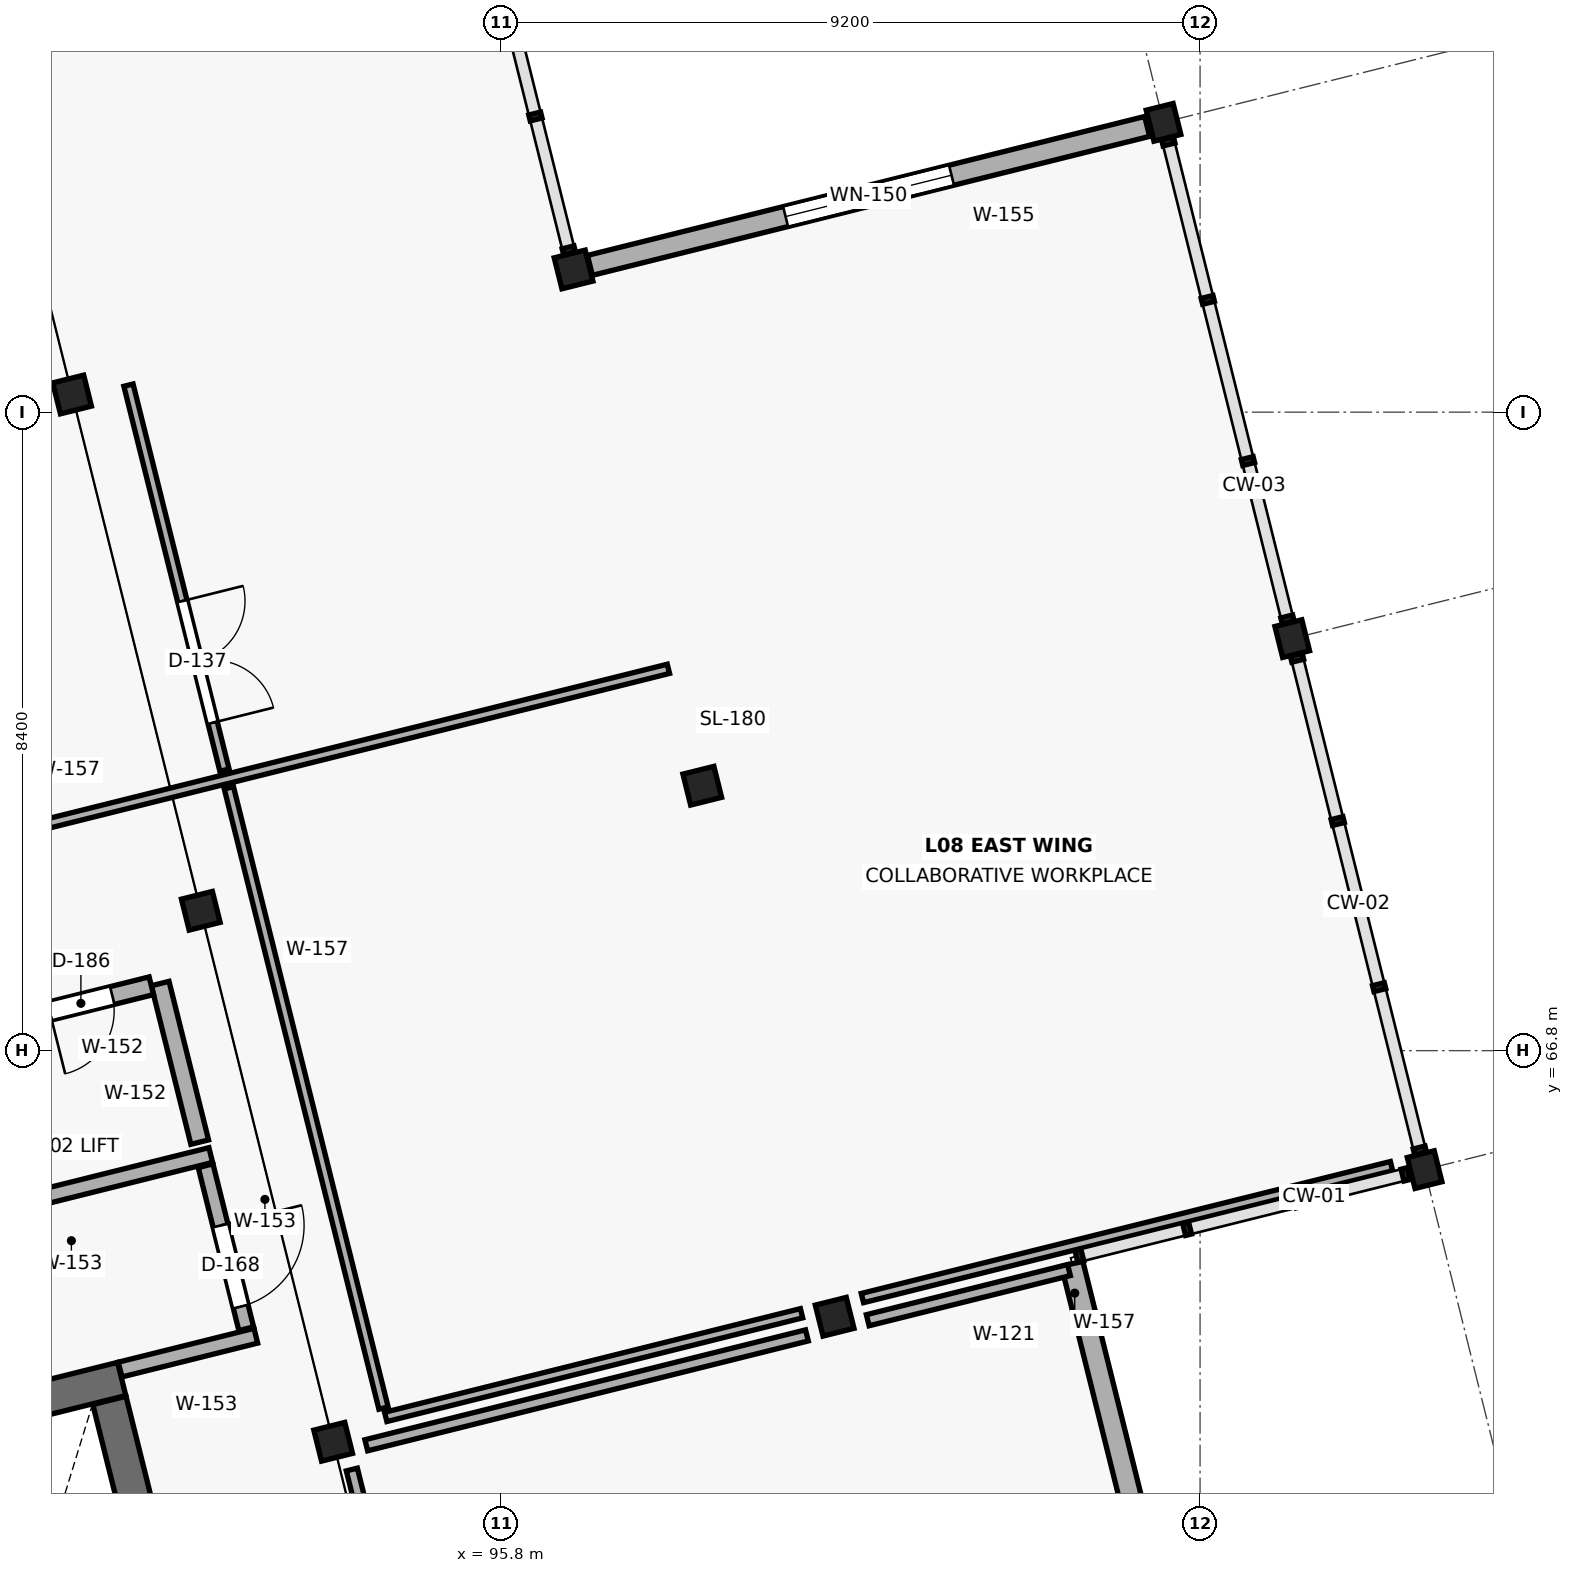
"""IFC4 building model, lengths in metres.
Left out: names, types, materials, properties, quantities, classifications, styles, units other than length and angle.
Written with IfcOpenShell. Run it as: python <this file> out.ifc"""

import sys

from ifc_helpers import new_model, si_unit, direction, frame, frame_2d, origin, origin_2d, place, context, subcontext, project, spatial, rectangle, extrude, element, fill, save


model = new_model("IFC4")
c1 = context("Model", 3, precision=1e-05, world=origin(), true_north=direction((0.0, 1.0)))
c2 = subcontext(c1, "Body", "Model", "MODEL_VIEW")
j1 = project(units=[si_unit("LENGTHUNIT", "METRE"), si_unit("PLANEANGLEUNIT", "RADIAN")], contexts=[c1])
p1 = place(None, origin())
s1 = spatial("IfcSite", under=j1, at=p1, CompositionType="ELEMENT")
p2 = place(p1, origin())
s2 = spatial("IfcBuilding", under=s1, at=p2, CompositionType="ELEMENT")
p3 = place(p2, frame((0.0, 0.0, 33.9)))
s3 = spatial("IfcBuildingStorey", under=s2, at=p3, CompositionType="ELEMENT", Elevation=33.9)
for number, where, z_axis, x_axis in (
    (1, (93.594, 61.654, 0.0), (0.0, 0.0, 1.0), (0.97, 0.242, 0.0)),
    (2, (91.852, 68.64, 0.0), (0.0, 0.0, 1.0), (0.97, 0.242, 0.0)),
    (3, (90.159, 75.432, 0.0), (0.0, 0.0, 1.0), (0.97, 0.242, 0.0)),
    (4, (100.192, 63.299, 0.0), (0.0, 0.0, 1.0), (0.97, 0.242, 0.0)),
    (5, (98.45, 70.285, 0.0), (0.0, 0.0, 1.0), (0.97, 0.242, 0.0)),
    (6, (96.757, 77.077, 0.0), (0.0, 0.0, 1.0), (0.97, 0.242, 0.0)),
):
    element("IfcColumn", number, at=place(p3, frame(where, z_axis=z_axis, x_axis=x_axis)), inside=s3, PredefinedType="COLUMN", context=c2, shape_type="SweptSolid", body=[
        extrude(rectangle(XDim=0.42, YDim=0.42, at=origin_2d()), origin(), (0.0, 0.0, 1.0), 3.9),
    ])
for number, where, z_axis, x_axis in (
    (7, (107.955, 65.235, 0.0), (0.0, 0.0, 1.0), (0.97, 0.242, 0.0)),
    (8, (106.213, 72.221, 0.0), (0.0, 0.0, 1.0), (0.97, 0.242, 0.0)),
    (9, (104.519, 79.013, 0.0), (0.0, 0.0, 1.0), (0.97, 0.242, 0.0)),
):
    element("IfcColumn", number, at=place(p3, frame(where, z_axis=z_axis, x_axis=x_axis)), inside=s3, PredefinedType="COLUMN", context=c2, shape_type="SweptSolid", body=[
        extrude(rectangle(XDim=0.365, YDim=0.42, at=origin_2d()), origin(), (0.0, 0.0, 1.0), 3.9),
    ])
p4 = place(p3, frame((103.316, 63.996, 0.0), z_axis=(0.0, 0.0, 1.0), x_axis=(0.241920698583, -0.970296024725, 0.0)))
e10 = element("IfcWall", 10, at=p4, inside=s3, PredefinedType="SOLIDWALL", context=c2, shape_type="SweptSolid", body=[
    extrude(rectangle(XDim=13.64, YDim=0.29, at=frame_2d((6.82, 0.0))), origin(), (0.0, 0.0, 1.0), 2.79),
])
p5 = place(p4, frame((5.695, 0.0, 0.8)))
e11 = element("IfcOpeningElement", 11, at=p5, cuts=e10, PredefinedType="OPENING", context=c2, shape_type="SweptSolid", body=[
    extrude(rectangle(XDim=2.25, YDim=1.95, at=frame_2d((1.125, 0.975))), frame((0.0, 0.157, 0.0), z_axis=(0.0, -1.0, 0.0), x_axis=(1.0, 0.0, 0.0)), (0.0, 0.0, 1.0), 0.314),
])
p6 = place(p3, frame((96.972, 77.131, 0.0), z_axis=(0.0, 0.0, 1.0), x_axis=(0.970290568044, 0.2419425832, 0.0)))
e12 = element("IfcWall", 12, at=p6, inside=s3, PredefinedType="SOLIDWALL", context=c2, shape_type="SweptSolid", body=[
    extrude(rectangle(XDim=7.556, YDim=0.27, at=frame_2d((3.778, 0.0))), origin(), (0.0, 0.0, 1.0), 2.79),
])
p7 = place(p6, frame((2.653, 0.0, 0.8)))
e13 = element("IfcOpeningElement", 13, at=p7, cuts=e12, PredefinedType="OPENING", context=c2, shape_type="SweptSolid", body=[
    extrude(rectangle(XDim=2.25, YDim=1.95, at=frame_2d((1.125, 0.975))), frame((0.0, 0.147, 0.0), z_axis=(0.0, -1.0, 0.0), x_axis=(1.0, 0.0, 0.0)), (0.0, 0.0, 1.0), 0.294),
])
p8 = place(p3, frame((90.812, 62.48, 0.0), z_axis=(0.0, 0.0, 1.0), x_axis=(-0.970309259708, -0.2418676095, 0.0)))
e14 = element("IfcWall", 14, at=p8, inside=s3, PredefinedType="SHEAR", context=c2, shape_type="SweptSolid", body=[
    extrude(rectangle(XDim=4.3, YDim=0.45, at=frame_2d((2.15, 0.0))), origin(), (0.0, 0.0, 1.0), 3.72),
])
p9 = place(p3, frame((92.436, 55.037, 0.0), z_axis=(0.0, 0.0, 1.0), x_axis=(-0.241920660665, 0.970296034179, 0.0)))
e15 = element("IfcWall", 15, at=p9, inside=s3, PredefinedType="SHEAR", context=c2, shape_type="SweptSolid", body=[
    extrude(rectangle(XDim=7.38, YDim=0.45, at=frame_2d((3.69, 0.0))), origin(), (0.0, 0.0, 1.0), 3.72),
])
p10 = place(p3, frame((90.791, 62.604, 0.0), z_axis=(0.0, 0.0, 1.0), x_axis=(0.970306180373, 0.241879962645, 0.0)))
e16 = element("IfcWall", 16, at=p10, inside=s3, PredefinedType="STANDARD", context=c2, shape_type="SweptSolid", body=[
    extrude(rectangle(XDim=1.84, YDim=0.2, at=frame_2d((0.92, 0.0))), origin(), (0.0, 0.0, 1.0), 3.72),
])
p11 = place(p3, frame((89.218, 64.737, 0.0), z_axis=(0.0, 0.0, 1.0), x_axis=(0.97027839681, 0.241991389687, 0.0)))
e17 = element("IfcWall", 17, at=p11, inside=s3, PredefinedType="STANDARD", context=c2, shape_type="SweptSolid", body=[
    extrude(rectangle(XDim=2.85, YDim=0.2, at=frame_2d((1.425, 0.0))), origin(), (0.0, 0.0, 1.0), 3.72),
])
p12 = place(p3, frame((91.916, 65.286, 0.0), z_axis=(0.0, 0.0, 1.0), x_axis=(0.241911789465, -0.970298245963, 0.0)))
e18 = element("IfcWall", 18, at=p12, inside=s3, PredefinedType="STANDARD", context=c2, shape_type="SweptSolid", body=[
    extrude(rectangle(XDim=2.21, YDim=0.2, at=frame_2d((1.105, 0.0))), origin(), (0.0, 0.0, 1.0), 3.72),
])
p13 = place(p12, frame((0.81, 0.0, 0.0)))
e19 = element("IfcOpeningElement", 19, at=p13, cuts=e18, PredefinedType="OPENING", context=c2, shape_type="SweptSolid", body=[
    extrude(rectangle(XDim=1.1, YDim=2.2, at=frame_2d((0.55, 1.1))), frame((0.0, 0.112, 0.0), z_axis=(0.0, -1.0, 0.0), x_axis=(1.0, 0.0, 0.0)), (0.0, 0.0, 1.0), 0.224),
])
p14 = place(p3, frame((91.838, 65.596, 0.0), z_axis=(0.0, 0.0, 1.0), x_axis=(-0.2418676095, 0.970309259708, 0.0)))
e20 = element("IfcWall", 20, at=p14, inside=s3, PredefinedType="STANDARD", context=c2, shape_type="SweptSolid", body=[
    extrude(rectangle(XDim=2.15, YDim=0.24, at=frame_2d((1.075, 0.0))), origin(), (0.0, 0.0, 1.0), 3.72),
])
p15 = place(p3, frame((91.202, 67.654, 0.0), z_axis=(0.0, 0.0, 1.0), x_axis=(-0.970304433136, -0.241886971613, 0.0)))
e21 = element("IfcWall", 21, at=p15, inside=s3, PredefinedType="STANDARD", context=c2, shape_type="SweptSolid", body=[
    extrude(rectangle(XDim=2.48, YDim=0.24, at=frame_2d((1.24, 0.0))), origin(), (0.0, 0.0, 1.0), 3.72),
])
p16 = place(p15, frame((0.53, 0.0, 0.0)))
e22 = element("IfcOpeningElement", 22, at=p16, cuts=e21, PredefinedType="OPENING", context=c2, shape_type="SweptSolid", body=[
    extrude(rectangle(XDim=0.85, YDim=2.1, at=frame_2d((0.425, 1.05))), frame((0.0, 0.132, 0.0), z_axis=(0.0, -1.0, 0.0), x_axis=(1.0, 0.0, 0.0)), (0.0, 0.0, 1.0), 0.264),
])
p17 = place(p3, frame((77.638, 66.745, 0.0), z_axis=(0.0, 0.0, 1.0), x_axis=(0.970296248646, 0.241919800477, 0.0)))
e23 = element("IfcWall", 23, at=p17, inside=s3, PredefinedType="PARTITIONING", context=c2, shape_type="SweptSolid", body=[
    extrude(rectangle(XDim=20.99, YDim=0.125, at=frame_2d((10.495, 0.0))), origin(), (0.0, 0.0, 1.0), 3.72),
])
p18 = place(p17, frame((8.681, 0.0, 0.0)))
e24 = element("IfcOpeningElement", 24, at=p18, cuts=e23, PredefinedType="OPENING", context=c2, shape_type="SweptSolid", body=[
    extrude(rectangle(XDim=1.65, YDim=2.35, at=frame_2d((0.825, 1.175))), frame((0.0, 0.074, 0.0), z_axis=(0.0, -1.0, 0.0), x_axis=(1.0, 0.0, 0.0)), (0.0, 0.0, 1.0), 0.149),
])
p19 = place(p3, frame((103.275, 63.913, 0.0), z_axis=(0.0, 0.0, 1.0), x_axis=(-0.970289695095, -0.241946084059, 0.0)))
e25 = element("IfcWall", 25, at=p19, inside=s3, PredefinedType="PARTITIONING", context=c2, shape_type="SweptSolid", body=[
    extrude(rectangle(XDim=2.729, YDim=0.15, at=frame_2d((1.364, 0.0))), origin(), (0.0, 0.0, 1.0), 3.72),
])
p20 = place(p3, frame((99.827, 63.054, 0.0), z_axis=(0.0, 0.0, 1.0), x_axis=(-0.970293732071, -0.24192989378, 0.0)))
e26 = element("IfcWall", 26, at=p20, inside=s3, PredefinedType="PARTITIONING", context=c2, shape_type="SweptSolid", body=[
    extrude(rectangle(XDim=5.975, YDim=0.15, at=frame_2d((2.988, 0.0))), origin(), (0.0, 0.0, 1.0), 3.72),
])
p21 = place(p3, frame((93.84, 61.289, 0.0), z_axis=(0.0, 0.0, 1.0), x_axis=(0.241921603562, -0.970295799089, 0.0)))
e27 = element("IfcWall", 27, at=p21, inside=s3, PredefinedType="PARTITIONING", context=c2, shape_type="SweptSolid", body=[
    extrude(rectangle(XDim=6.175, YDim=0.15, at=frame_2d((3.087, 0.0))), origin(), (0.0, 0.0, 1.0), 3.035),
])
p22 = place(p3, frame((94.286, 61.981, 0.0), z_axis=(0.0, 0.0, 1.0), x_axis=(0.970297669748, 0.241914100624, 0.0)))
e28 = element("IfcWall", 28, at=p22, inside=s3, PredefinedType="PARTITIONING", context=c2, shape_type="SweptSolid", body=[
    extrude(rectangle(XDim=5.638, YDim=0.125, at=frame_2d((2.819, 0.0))), origin(), (0.0, 0.0, 1.0), 3.72),
])
p23 = place(p3, frame((100.557, 63.545, 0.0), z_axis=(0.0, 0.0, 1.0), x_axis=(0.970294426978, 0.241927106741, 0.0)))
e29 = element("IfcWall", 29, at=p23, inside=s3, PredefinedType="PARTITIONING", context=c2, shape_type="SweptSolid", body=[
    extrude(rectangle(XDim=7.175, YDim=0.125, at=frame_2d((3.587, 0.0))), origin(), (0.0, 0.0, 1.0), 3.72),
])
p24 = place(p3, frame((90.901, 75.556, 0.0), z_axis=(0.0, 0.0, 1.0), x_axis=(0.241897292077, -0.970301860292, 0.0)))
e30 = element("IfcWall", 30, at=p24, inside=s3, PredefinedType="PARTITIONING", context=c2, shape_type="SweptSolid", body=[
    extrude(rectangle(XDim=5.22, YDim=0.125, at=frame_2d((2.61, 0.0))), origin(), (0.0, 0.0, 1.0), 3.72),
])
p25 = place(p24, frame((2.928, 0.0, 0.0)))
e31 = element("IfcOpeningElement", 31, at=p25, cuts=e30, PredefinedType="OPENING", context=c2, shape_type="SweptSolid", body=[
    extrude(rectangle(XDim=1.65, YDim=2.35, at=frame_2d((0.825, 1.175))), frame((0.0, 0.074, 0.0), z_axis=(0.0, -1.0, 0.0), x_axis=(1.0, 0.0, 0.0)), (0.0, 0.0, 1.0), 0.149),
])
p26 = place(p3, frame((92.222, 70.258, 0.0), z_axis=(0.0, 0.0, 1.0), x_axis=(0.241934490518, -0.970292585923, 0.0)))
e32 = element("IfcWall", 32, at=p26, inside=s3, PredefinedType="PARTITIONING", context=c2, shape_type="SweptSolid", body=[
    extrude(rectangle(XDim=8.41, YDim=0.125, at=frame_2d((4.205, 0.0))), origin(), (0.0, 0.0, 1.0), 3.72),
])
p27 = place(p7, origin())
e33 = element("IfcWindow", 33, at=p27, inside=s3, PartitioningType="SINGLE_PANEL", PredefinedType="WINDOW", context=c2, shape_type="SweptSolid", body=[
    extrude(rectangle(XDim=2.25, YDim=1.95, at=frame_2d((1.125, 0.975))), frame((0.0, 0.03, 0.0), z_axis=(0.0, -1.0, 0.0), x_axis=(1.0, 0.0, 0.0)), (0.0, 0.0, 1.0), 0.06),
])
fill(e13, e33)
p28 = place(p13, origin())
e34 = element("IfcDoor", 34, at=p28, inside=s3, OperationType="SINGLE_SWING_LEFT", PredefinedType="DOOR", context=c2, shape_type="SweptSolid", body=[
    extrude(rectangle(XDim=1.1, YDim=2.2, at=frame_2d((0.55, 1.1))), frame((0.0, 0.025, 0.0), z_axis=(0.0, -1.0, 0.0), x_axis=(1.0, 0.0, 0.0)), (0.0, 0.0, 1.0), 0.05),
])
fill(e19, e34)
p29 = place(p16, origin())
e35 = element("IfcDoor", 35, at=p29, inside=s3, OperationType="SINGLE_SWING_RIGHT", PredefinedType="DOOR", context=c2, shape_type="SweptSolid", body=[
    extrude(rectangle(XDim=0.85, YDim=2.1, at=frame_2d((0.425, 1.05))), frame((0.0, 0.025, 0.0), z_axis=(0.0, -1.0, 0.0), x_axis=(1.0, 0.0, 0.0)), (0.0, 0.0, 1.0), 0.05),
])
fill(e22, e35)
p30 = place(p25, origin())
e36 = element("IfcDoor", 36, at=p30, inside=s3, OperationType="DOUBLE_DOOR_SINGLE_SWING", PredefinedType="DOOR", context=c2, shape_type="SweptSolid", body=[
    extrude(rectangle(XDim=1.65, YDim=2.35, at=frame_2d((0.825, 1.175))), frame((0.0, 0.025, 0.0), z_axis=(0.0, -1.0, 0.0), x_axis=(1.0, 0.0, 0.0)), (0.0, 0.0, 1.0), 0.05),
])
fill(e31, e36)
save(model, sys.argv[1])
